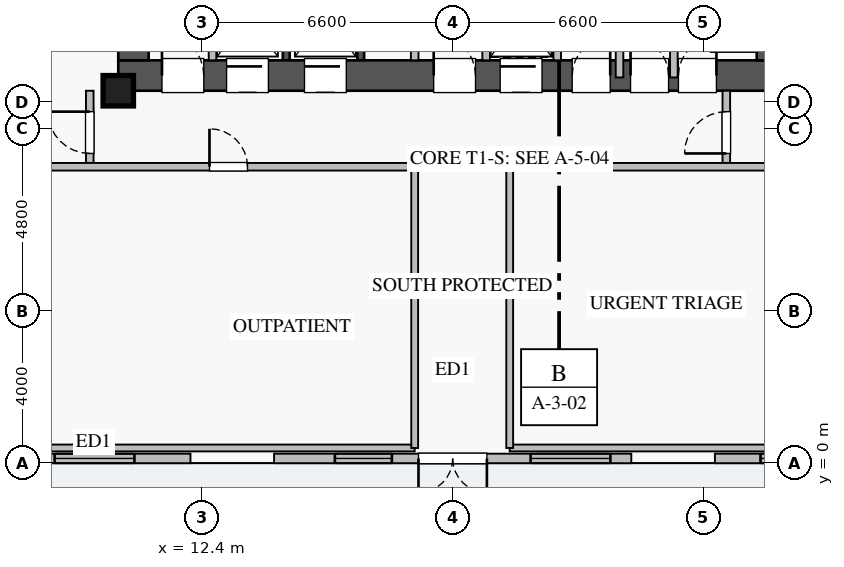
"""IFC4 building model, lengths in metres.
Left out: names, types, materials, properties, quantities, classifications, styles, units other than length and angle.
Written with IfcOpenShell. Run it as: python <this file> out.ifc"""

import sys

from ifc_helpers import new_model, si_unit, direction, frame, frame_2d, origin, origin_2d, place, context, subcontext, project, spatial, rectangle, extrude, source, transform, mapped, element, fill, save


model = new_model("IFC4")
c1 = context("Model", 3, precision=1e-05, world=origin(), true_north=direction((0.0, 1.0)))
c2 = subcontext(c1, "Body", "Model", "MODEL_VIEW")
j1 = project(units=[si_unit("LENGTHUNIT", "METRE"), si_unit("PLANEANGLEUNIT", "RADIAN")], contexts=[c1])
p1 = place(None, origin())
s1 = spatial("IfcSite", under=j1, at=p1, CompositionType="ELEMENT")
p2 = place(p1, origin())
s2 = spatial("IfcBuilding", under=s1, at=p2, CompositionType="ELEMENT")
p3 = place(p2, origin())
s3 = spatial("IfcBuildingStorey", under=s2, at=p3, CompositionType="ELEMENT", Elevation=0.0)
for number, where, z_axis, x_axis in (
    (1, (14.62, 10.6, 0.0), (0.0, 0.0, 1.0), (0.0, 1.0, 0.0)),
    (2, (16.58, 10.6, 0.0), (0.0, 0.0, 1.0), (0.0, 1.0, 0.0)),
):
    element("IfcWall", number, at=place(p3, frame(where, z_axis=z_axis, x_axis=x_axis)), inside=s3, PredefinedType="SHEAR", context=c2, shape_type="SweptSolid", body=[
        extrude(rectangle(XDim=2.2, YDim=0.18, at=frame_2d((1.1, 0.0))), origin(), (0.0, 0.0, 1.0), 4.78),
    ])
p4 = place(p3, frame((10.2, 10.2, 0.0), z_axis=(0.0, 0.0, 1.0), x_axis=(1.0, 0.0, 0.0)))
e3 = element("IfcWall", 3, at=p4, inside=s3, PredefinedType="SHEAR", context=c2, shape_type="SweptSolid", body=[
    extrude(rectangle(XDim=17.6, YDim=0.8, at=frame_2d((8.8, 0.0))), origin(), (0.0, 0.0, 1.0), 5.0),
])
p5 = place(p4, frame((1.15, 0.0, 0.0)))
e4 = element("IfcOpeningElement", 4, at=p5, cuts=e3, PredefinedType="OPENING", context=c2, shape_type="SweptSolid", body=[
    extrude(rectangle(XDim=1.1, YDim=2.05, at=frame_2d((0.55, 1.025))), frame((0.0, 0.41, 0.0), z_axis=(0.0, -1.0, 0.0), x_axis=(1.0, 0.0, 0.0)), (0.0, 0.0, 1.0), 0.82),
])
p6 = place(p4, frame((8.3, 0.0, 0.0)))
e5 = element("IfcOpeningElement", 5, at=p6, cuts=e3, PredefinedType="OPENING", context=c2, shape_type="SweptSolid", body=[
    extrude(rectangle(XDim=1.1, YDim=2.05, at=frame_2d((0.55, 1.025))), frame((0.0, 0.41, 0.0), z_axis=(0.0, -1.0, 0.0), x_axis=(1.0, 0.0, 0.0)), (0.0, 0.0, 1.0), 0.82),
])
p7 = place(p4, frame((10.05, 0.0, 0.0)))
e6 = element("IfcOpeningElement", 6, at=p7, cuts=e3, PredefinedType="OPENING", context=c2, shape_type="SweptSolid", body=[
    extrude(rectangle(XDim=1.1, YDim=2.05, at=frame_2d((0.55, 1.025))), frame((0.0, 0.41, 0.0), z_axis=(0.0, -1.0, 0.0), x_axis=(1.0, 0.0, 0.0)), (0.0, 0.0, 1.0), 0.82),
])
p8 = place(p4, frame((4.9, 0.0, 0.0)))
e7 = element("IfcOpeningElement", 7, at=p8, cuts=e3, PredefinedType="OPENING", context=c2, shape_type="SweptSolid", body=[
    extrude(rectangle(XDim=1.1, YDim=2.05, at=frame_2d((0.55, 1.025))), frame((0.0, 0.41, 0.0), z_axis=(0.0, -1.0, 0.0), x_axis=(1.0, 0.0, 0.0)), (0.0, 0.0, 1.0), 0.82),
])
p9 = place(p4, frame((2.85, 0.0, 0.0)))
e8 = element("IfcOpeningElement", 8, at=p9, cuts=e3, PredefinedType="OPENING", context=c2, shape_type="SweptSolid", body=[
    extrude(rectangle(XDim=1.1, YDim=2.05, at=frame_2d((0.55, 1.025))), frame((0.0, 0.41, 0.0), z_axis=(0.0, -1.0, 0.0), x_axis=(1.0, 0.0, 0.0)), (0.0, 0.0, 1.0), 0.82),
])
p10 = place(p4, frame((14.74, 0.0, 0.0)))
e9 = element("IfcOpeningElement", 9, at=p10, cuts=e3, PredefinedType="OPENING", context=c2, shape_type="SweptSolid", body=[
    extrude(rectangle(XDim=1.0, YDim=2.05, at=frame_2d((0.5, 1.025))), frame((0.0, 0.41, 0.0), z_axis=(0.0, -1.0, 0.0), x_axis=(1.0, 0.0, 0.0)), (0.0, 0.0, 1.0), 0.82),
])
p11 = place(p4, frame((11.945, 0.0, 0.0)))
e10 = element("IfcOpeningElement", 10, at=p11, cuts=e3, PredefinedType="OPENING", context=c2, shape_type="SweptSolid", body=[
    extrude(rectangle(XDim=1.0, YDim=2.05, at=frame_2d((0.5, 1.025))), frame((0.0, 0.41, 0.0), z_axis=(0.0, -1.0, 0.0), x_axis=(1.0, 0.0, 0.0)), (0.0, 0.0, 1.0), 0.82),
])
p12 = place(p4, frame((13.48, 0.0, 0.0)))
e11 = element("IfcOpeningElement", 11, at=p12, cuts=e3, PredefinedType="OPENING", context=c2, shape_type="SweptSolid", body=[
    extrude(rectangle(XDim=1.0, YDim=2.05, at=frame_2d((0.5, 1.025))), frame((0.0, 0.41, 0.0), z_axis=(0.0, -1.0, 0.0), x_axis=(1.0, 0.0, 0.0)), (0.0, 0.0, 1.0), 0.82),
])
p13 = place(p3, frame((10.6, 10.6, 0.0), z_axis=(0.0, 0.0, 1.0), x_axis=(0.0, 1.0, 0.0)))
e12 = element("IfcWall", 12, at=p13, inside=s3, PredefinedType="SHEAR", context=c2, shape_type="SweptSolid", body=[
    extrude(rectangle(XDim=5.6, YDim=0.8, at=frame_2d((2.8, 0.0))), origin(), (0.0, 0.0, 1.0), 5.0),
])
p14 = place(p3, frame((27.4, 10.6, 0.0), z_axis=(0.0, 0.0, 1.0), x_axis=(0.0, 1.0, 0.0)))
e13 = element("IfcWall", 13, at=p14, inside=s3, PredefinedType="SHEAR", context=c2, shape_type="SweptSolid", body=[
    extrude(rectangle(XDim=5.6, YDim=0.8, at=frame_2d((2.8, 0.0))), origin(), (0.0, 0.0, 1.0), 5.0),
])
p15 = place(p14, frame((2.1, 0.0, 0.0)))
e14 = element("IfcOpeningElement", 14, at=p15, cuts=e13, PredefinedType="OPENING", context=c2, shape_type="SweptSolid", body=[
    extrude(rectangle(XDim=1.3, YDim=2.05, at=frame_2d((0.65, 1.025))), frame((0.0, 0.41, 0.0), z_axis=(0.0, -1.0, 0.0), x_axis=(1.0, 0.0, 0.0)), (0.0, 0.0, 1.0), 0.82),
])
m1 = source(origin(), c2, "Body", "SweptSolid", [
    extrude(rectangle(XDim=0.8, YDim=0.8, at=origin_2d()), origin(), (0.0, 0.0, 1.0), 5.0),
])
p16 = place(p3, frame((10.2, 9.8, 0.0), z_axis=(0.0, 0.0, 1.0), x_axis=(1.0, 0.0, 0.0)))
e15 = element("IfcColumn", 15, at=p16, inside=s3, PredefinedType="PILASTER", context=c2, shape_type="MappedRepresentation", body=[
    mapped(m1, transform((0.0, 0.0, 0.0), x_axis=(1.0, 0.0, 0.0), y_axis=(0.0, 1.0, 0.0), z_axis=(0.0, 0.0, 1.0), scale=1.0)),
])
p17 = place(p3, frame((2.0, 0.125, 0.0), z_axis=(0.0, 0.0, 1.0), x_axis=(1.0, 0.0, 0.0)))
e16 = element("IfcWall", 16, at=p17, inside=s3, PredefinedType="STANDARD", context=c2, shape_type="SweptSolid", body=[
    extrude(rectangle(XDim=10.1, YDim=0.25, at=frame_2d((5.05, 0.0))), origin(), (0.0, 0.0, 1.0), 4.32),
])
p18 = place(p17, frame((4.15, 0.0, 0.0)))
e17 = element("IfcOpeningElement", 17, at=p18, cuts=e16, PredefinedType="OPENING", context=c2, shape_type="SweptSolid", body=[
    extrude(rectangle(XDim=1.8, YDim=2.2, at=frame_2d((0.9, 1.1))), frame((0.0, 0.135, 0.0), z_axis=(0.0, -1.0, 0.0), x_axis=(1.0, 0.0, 0.0)), (0.0, 0.0, 1.0), 0.27),
])
p19 = place(p17, frame((1.775, 0.0, 0.9)))
e18 = element("IfcOpeningElement", 18, at=p19, cuts=e16, PredefinedType="OPENING", context=c2, shape_type="SweptSolid", body=[
    extrude(rectangle(XDim=1.5, YDim=1.45, at=frame_2d((0.75, 0.725))), frame((0.0, 0.135, 0.0), z_axis=(0.0, -1.0, 0.0), x_axis=(1.0, 0.0, 0.0)), (0.0, 0.0, 1.0), 0.27),
])
p20 = place(p17, frame((6.525, 0.0, 0.9)))
e19 = element("IfcOpeningElement", 19, at=p20, cuts=e16, PredefinedType="OPENING", context=c2, shape_type="SweptSolid", body=[
    extrude(rectangle(XDim=2.1, YDim=1.48, at=frame_2d((1.05, 0.74))), frame((0.0, 0.135, 0.0), z_axis=(0.0, -1.0, 0.0), x_axis=(1.0, 0.0, 0.0)), (0.0, 0.0, 1.0), 0.27),
])
p21 = place(p3, frame((14.3, 0.125, 0.0), z_axis=(0.0, 0.0, 1.0), x_axis=(1.0, 0.0, 0.0)))
e20 = element("IfcWall", 20, at=p21, inside=s3, PredefinedType="STANDARD", context=c2, shape_type="SweptSolid", body=[
    extrude(rectangle(XDim=9.4, YDim=0.25, at=frame_2d((4.7, 0.0))), origin(), (0.0, 0.0, 1.0), 4.32),
])
p22 = place(p21, frame((3.8, 0.0, 0.0)))
e21 = element("IfcOpeningElement", 21, at=p22, cuts=e20, PredefinedType="OPENING", context=c2, shape_type="SweptSolid", body=[
    extrude(rectangle(XDim=1.8, YDim=2.2, at=frame_2d((0.9, 1.1))), frame((0.0, 0.135, 0.0), z_axis=(0.0, -1.0, 0.0), x_axis=(1.0, 0.0, 0.0)), (0.0, 0.0, 1.0), 0.27),
])
p23 = place(p21, frame((1.6, 0.0, 0.9)))
e22 = element("IfcOpeningElement", 22, at=p23, cuts=e20, PredefinedType="OPENING", context=c2, shape_type="SweptSolid", body=[
    extrude(rectangle(XDim=1.5, YDim=1.45, at=frame_2d((0.75, 0.725))), frame((0.0, 0.135, 0.0), z_axis=(0.0, -1.0, 0.0), x_axis=(1.0, 0.0, 0.0)), (0.0, 0.0, 1.0), 0.27),
])
p24 = place(p21, frame((6.75, 0.0, 0.9)))
e23 = element("IfcOpeningElement", 23, at=p24, cuts=e20, PredefinedType="OPENING", context=c2, shape_type="SweptSolid", body=[
    extrude(rectangle(XDim=2.1, YDim=1.5, at=frame_2d((1.05, 0.75))), frame((0.0, 0.135, 0.0), z_axis=(0.0, -1.0, 0.0), x_axis=(1.0, 0.0, 0.0)), (0.0, 0.0, 1.0), 0.27),
])
p25 = place(p3, frame((25.9, 0.125, 0.0), z_axis=(0.0, 0.0, 1.0), x_axis=(1.0, 0.0, 0.0)))
e24 = element("IfcWall", 24, at=p25, inside=s3, PredefinedType="STANDARD", context=c2, shape_type="SweptSolid", body=[
    extrude(rectangle(XDim=15.6, YDim=0.25, at=frame_2d((7.8, 0.0))), origin(), (0.0, 0.0, 1.0), 4.32),
])
p26 = place(p25, frame((6.9, 0.0, 0.0)))
e25 = element("IfcOpeningElement", 25, at=p26, cuts=e24, PredefinedType="OPENING", context=c2, shape_type="SweptSolid", body=[
    extrude(rectangle(XDim=1.8, YDim=2.2, at=frame_2d((0.9, 1.1))), frame((0.0, 0.135, 0.0), z_axis=(0.0, -1.0, 0.0), x_axis=(1.0, 0.0, 0.0)), (0.0, 0.0, 1.0), 0.27),
])
p27 = place(p25, frame((1.2, 0.0, 0.9)))
e26 = element("IfcOpeningElement", 26, at=p27, cuts=e24, PredefinedType="OPENING", context=c2, shape_type="SweptSolid", body=[
    extrude(rectangle(XDim=1.5, YDim=1.45, at=frame_2d((0.75, 0.725))), frame((0.0, 0.135, 0.0), z_axis=(0.0, -1.0, 0.0), x_axis=(1.0, 0.0, 0.0)), (0.0, 0.0, 1.0), 0.27),
])
p28 = place(p25, frame((12.75, 0.0, 0.9)))
e27 = element("IfcOpeningElement", 27, at=p28, cuts=e24, PredefinedType="OPENING", context=c2, shape_type="SweptSolid", body=[
    extrude(rectangle(XDim=1.8, YDim=1.45, at=frame_2d((0.9, 0.725))), frame((0.0, 0.135, 0.0), z_axis=(0.0, -1.0, 0.0), x_axis=(1.0, 0.0, 0.0)), (0.0, 0.0, 1.0), 0.27),
])
for number, where, z_axis, x_axis in (
    (28, (12.68, 10.6, 0.0), (0.0, 0.0, 1.0), (0.0, 1.0, 0.0)),
    (29, (18.0, 10.6, 0.0), (0.0, 0.0, 1.0), (0.0, 1.0, 0.0)),
    (30, (19.88, 10.6, 0.0), (0.0, 0.0, 1.0), (0.0, 1.0, 0.0)),
):
    element("IfcWall", number, at=place(p3, frame(where, z_axis=z_axis, x_axis=x_axis)), inside=s3, PredefinedType="PARTITIONING", context=c2, shape_type="SweptSolid", body=[
        extrude(rectangle(XDim=2.21, YDim=0.2, at=frame_2d((1.105, 0.0))), origin(), (0.0, 0.0, 1.0), 4.78),
    ])
p29 = place(p3, frame((24.82, 10.15, 0.0), z_axis=(0.0, 0.0, 1.0), x_axis=(0.0, 1.0, 0.0)))
e31 = element("IfcWall", 31, at=p29, inside=s3, PredefinedType="PARTITIONING", context=c2, shape_type="SweptSolid", body=[
    extrude(rectangle(XDim=2.65, YDim=0.2, at=frame_2d((1.325, 0.0))), origin(), (0.0, 0.0, 1.0), 4.78),
])
p30 = place(p3, frame((21.75, 10.6, 0.0), z_axis=(0.0, 0.0, 1.0), x_axis=(0.0, 1.0, 0.0)))
e32 = element("IfcWall", 32, at=p30, inside=s3, PredefinedType="PARTITIONING", context=c2, shape_type="SweptSolid", body=[
    extrude(rectangle(XDim=2.2, YDim=0.2, at=frame_2d((1.1, 0.0))), origin(), (0.0, 0.0, 1.0), 4.78),
])
p31 = place(p3, frame((23.39, 10.15, 0.0), z_axis=(0.0, 0.0, 1.0), x_axis=(0.0, 1.0, 0.0)))
e33 = element("IfcWall", 33, at=p31, inside=s3, PredefinedType="PARTITIONING", context=c2, shape_type="SweptSolid", body=[
    extrude(rectangle(XDim=2.65, YDim=0.2, at=frame_2d((1.325, 0.0))), origin(), (0.0, 0.0, 1.0), 4.78),
])
p32 = place(p3, frame((9.45, 7.8, 0.0), z_axis=(0.0, 0.0, 1.0), x_axis=(0.0, 1.0, 0.0)))
e34 = element("IfcWall", 34, at=p32, inside=s3, PredefinedType="PARTITIONING", context=c2, shape_type="SweptSolid", body=[
    extrude(rectangle(XDim=2.0, YDim=0.2, at=frame_2d((1.0, 0.0))), origin(), (0.0, 0.0, 1.0), 4.78),
])
p33 = place(p32, frame((0.35, 0.0, 0.0)))
e35 = element("IfcOpeningElement", 35, at=p33, cuts=e34, PredefinedType="OPENING", context=c2, shape_type="SweptSolid", body=[
    extrude(rectangle(XDim=1.1, YDim=2.05, at=frame_2d((0.55, 1.025))), frame((0.0, 0.11, 0.0), z_axis=(0.0, -1.0, 0.0), x_axis=(1.0, 0.0, 0.0)), (0.0, 0.0, 1.0), 0.22),
])
p34 = place(p3, frame((26.2, 7.8, 0.0), z_axis=(0.0, 0.0, 1.0), x_axis=(0.0, 1.0, 0.0)))
e36 = element("IfcWall", 36, at=p34, inside=s3, PredefinedType="PARTITIONING", context=c2, shape_type="SweptSolid", body=[
    extrude(rectangle(XDim=2.0, YDim=0.2, at=frame_2d((1.0, 0.0))), origin(), (0.0, 0.0, 1.0), 4.78),
])
p35 = place(p34, frame((0.35, 0.0, 0.0)))
e37 = element("IfcOpeningElement", 37, at=p35, cuts=e36, PredefinedType="OPENING", context=c2, shape_type="SweptSolid", body=[
    extrude(rectangle(XDim=1.1, YDim=2.05, at=frame_2d((0.55, 1.025))), frame((0.0, 0.11, 0.0), z_axis=(0.0, -1.0, 0.0), x_axis=(1.0, 0.0, 0.0)), (0.0, 0.0, 1.0), 0.22),
])
p36 = place(p3, frame((8.2, 7.8, 0.0), z_axis=(0.0, 0.0, 1.0), x_axis=(1.0, 0.0, 0.0)))
e38 = element("IfcWall", 38, at=p36, inside=s3, PredefinedType="PARTITIONING", context=c2, shape_type="SweptSolid", body=[
    extrude(rectangle(XDim=9.8, YDim=0.2, at=frame_2d((4.9, 0.0))), origin(), (0.0, 0.0, 1.0), 4.78),
])
p37 = place(p36, frame((4.4, 0.0, 0.0)))
e39 = element("IfcOpeningElement", 39, at=p37, cuts=e38, PredefinedType="OPENING", context=c2, shape_type="SweptSolid", body=[
    extrude(rectangle(XDim=1.0, YDim=2.05, at=frame_2d((0.5, 1.025))), frame((0.0, 0.11, 0.0), z_axis=(0.0, -1.0, 0.0), x_axis=(1.0, 0.0, 0.0)), (0.0, 0.0, 1.0), 0.22),
])
p38 = place(p3, frame((20.5, 7.8, 0.0), z_axis=(0.0, 0.0, 1.0), x_axis=(1.0, 0.0, 0.0)))
e40 = element("IfcWall", 40, at=p38, inside=s3, PredefinedType="PARTITIONING", context=c2, shape_type="SweptSolid", body=[
    extrude(rectangle(XDim=12.0, YDim=0.2, at=frame_2d((6.0, 0.0))), origin(), (0.0, 0.0, 1.0), 4.78),
])
p39 = place(p38, frame((8.65, 0.0, 0.0)))
e41 = element("IfcOpeningElement", 41, at=p39, cuts=e40, PredefinedType="OPENING", context=c2, shape_type="SweptSolid", body=[
    extrude(rectangle(XDim=1.0, YDim=2.05, at=frame_2d((0.5, 1.025))), frame((0.0, 0.11, 0.0), z_axis=(0.0, -1.0, 0.0), x_axis=(1.0, 0.0, 0.0)), (0.0, 0.0, 1.0), 0.22),
])
p40 = place(p3, frame((8.2, 0.4, 0.0), z_axis=(0.0, 0.0, 1.0), x_axis=(1.0, 0.0, 0.0)))
e42 = element("IfcWall", 42, at=p40, inside=s3, PredefinedType="PARTITIONING", context=c2, shape_type="SweptSolid", body=[
    extrude(rectangle(XDim=9.8, YDim=0.18, at=frame_2d((4.9, 0.0))), origin(), (0.0, 0.0, 1.0), 4.78),
])
p41 = place(p3, frame((18.0, 0.4, 0.0), z_axis=(0.0, 0.0, 1.0), x_axis=(0.0, 1.0, 0.0)))
e43 = element("IfcWall", 43, at=p41, inside=s3, PredefinedType="PARTITIONING", context=c2, shape_type="SweptSolid", body=[
    extrude(rectangle(XDim=7.4, YDim=0.18, at=frame_2d((3.7, 0.0))), origin(), (0.0, 0.0, 1.0), 4.78),
])
p42 = place(p3, frame((20.5, 0.4, 0.0), z_axis=(0.0, 0.0, 1.0), x_axis=(1.0, 0.0, 0.0)))
e44 = element("IfcWall", 44, at=p42, inside=s3, PredefinedType="PARTITIONING", context=c2, shape_type="SweptSolid", body=[
    extrude(rectangle(XDim=12.0, YDim=0.18, at=frame_2d((6.0, 0.0))), origin(), (0.0, 0.0, 1.0), 4.78),
])
p43 = place(p3, frame((20.5, 0.4, 0.0), z_axis=(0.0, 0.0, 1.0), x_axis=(0.0, 1.0, 0.0)))
e45 = element("IfcWall", 45, at=p43, inside=s3, PredefinedType="PARTITIONING", context=c2, shape_type="SweptSolid", body=[
    extrude(rectangle(XDim=7.4, YDim=0.18, at=frame_2d((3.7, 0.0))), origin(), (0.0, 0.0, 1.0), 4.78),
])
m2 = source(origin(), c2, "Body", "SweptSolid", [
    extrude(rectangle(XDim=2.1, YDim=1.48, at=frame_2d((1.05, 0.74))), frame((0.0, 0.03, 0.0), z_axis=(0.0, -1.0, 0.0), x_axis=(1.0, 0.0, 0.0)), (0.0, 0.0, 1.0), 0.06),
])
p44 = place(p20, origin())
e46 = element("IfcWindow", 46, at=p44, inside=s3, PartitioningType="TRIPLE_PANEL_VERTICAL", PredefinedType="WINDOW", context=c2, shape_type="MappedRepresentation", body=[
    mapped(m2, transform((0.0, 0.0, 0.0), x_axis=(1.0, 0.0, 0.0), y_axis=(0.0, 1.0, 0.0), z_axis=(0.0, 0.0, 1.0), scale=1.0)),
])
fill(e19, e46)
m3 = source(origin(), c2, "Body", "SweptSolid", [
    extrude(rectangle(XDim=1.8, YDim=2.2, at=frame_2d((0.9, 1.1))), frame((0.0, 0.025, 0.0), z_axis=(0.0, -1.0, 0.0), x_axis=(1.0, 0.0, 0.0)), (0.0, 0.0, 1.0), 0.05),
])
p45 = place(p22, frame((1.8, 0.0, 0.0), z_axis=(0.0, 0.0, 1.0), x_axis=(-1.0, 0.0, 0.0)))
e47 = element("IfcDoor", 47, at=p45, inside=s3, OperationType="DOUBLE_DOOR_SINGLE_SWING", PredefinedType="DOOR", context=c2, shape_type="MappedRepresentation", body=[
    mapped(m3, transform((0.0, 0.0, 0.0), x_axis=(1.0, 0.0, 0.0), y_axis=(0.0, 1.0, 0.0), z_axis=(0.0, 0.0, 1.0), scale=1.0)),
])
fill(e21, e47)
m4 = source(origin(), c2, "Body", "SweptSolid", [
    extrude(rectangle(XDim=1.5, YDim=1.45, at=frame_2d((0.75, 0.725))), frame((0.0, 0.03, 0.0), z_axis=(0.0, -1.0, 0.0), x_axis=(1.0, 0.0, 0.0)), (0.0, 0.0, 1.0), 0.06),
])
p46 = place(p23, origin())
e48 = element("IfcWindow", 48, at=p46, inside=s3, PartitioningType="DOUBLE_PANEL_VERTICAL", PredefinedType="WINDOW", context=c2, shape_type="MappedRepresentation", body=[
    mapped(m4, transform((0.0, 0.0, 0.0), x_axis=(1.0, 0.0, 0.0), y_axis=(0.0, 1.0, 0.0), z_axis=(0.0, 0.0, 1.0), scale=1.0)),
])
fill(e22, e48)
m5 = source(origin(), c2, "Body", "SweptSolid", [
    extrude(rectangle(XDim=2.1, YDim=1.5, at=frame_2d((1.05, 0.75))), frame((0.0, 0.03, 0.0), z_axis=(0.0, -1.0, 0.0), x_axis=(1.0, 0.0, 0.0)), (0.0, 0.0, 1.0), 0.06),
])
p47 = place(p24, origin())
e49 = element("IfcWindow", 49, at=p47, inside=s3, PartitioningType="TRIPLE_PANEL_VERTICAL", PredefinedType="WINDOW", context=c2, shape_type="MappedRepresentation", body=[
    mapped(m5, transform((0.0, 0.0, 0.0), x_axis=(1.0, 0.0, 0.0), y_axis=(0.0, 1.0, 0.0), z_axis=(0.0, 0.0, 1.0), scale=1.0)),
])
fill(e23, e49)
p48 = place(p27, origin())
e50 = element("IfcWindow", 50, at=p48, inside=s3, PartitioningType="DOUBLE_PANEL_VERTICAL", PredefinedType="WINDOW", context=c2, shape_type="MappedRepresentation", body=[
    mapped(m4, transform((0.0, 0.0, 0.0), x_axis=(1.0, 0.0, 0.0), y_axis=(0.0, 1.0, 0.0), z_axis=(0.0, 0.0, 1.0), scale=1.0)),
])
fill(e26, e50)
m6 = source(origin(), c2, "Body", "SweptSolid", [
    extrude(rectangle(XDim=1.1, YDim=2.05, at=frame_2d((0.55, 1.025))), frame((0.0, 0.025, 0.0), z_axis=(0.0, -1.0, 0.0), x_axis=(1.0, 0.0, 0.0)), (0.0, 0.0, 1.0), 0.05),
])
p49 = place(p5, origin())
e51 = element("IfcDoor", 51, at=p49, inside=s3, OperationType="SINGLE_SWING_LEFT", PredefinedType="DOOR", context=c2, shape_type="MappedRepresentation", body=[
    mapped(m6, transform((0.0, 0.0, 0.0), x_axis=(1.0, 0.0, 0.0), y_axis=(0.0, 1.0, 0.0), z_axis=(0.0, 0.0, 1.0), scale=1.0)),
])
fill(e4, e51)
p50 = place(p6, origin())
e52 = element("IfcDoor", 52, at=p50, inside=s3, OperationType="SINGLE_SWING_LEFT", PredefinedType="DOOR", context=c2, shape_type="MappedRepresentation", body=[
    mapped(m6, transform((0.0, 0.0, 0.0), x_axis=(1.0, 0.0, 0.0), y_axis=(0.0, 1.0, 0.0), z_axis=(0.0, 0.0, 1.0), scale=1.0)),
])
fill(e5, e52)
p51 = place(p7, origin())
e53 = element("IfcDoor", 53, at=p51, inside=s3, OperationType="SLIDING_TO_RIGHT", PredefinedType="DOOR", context=c2, shape_type="MappedRepresentation", body=[
    mapped(m6, transform((0.0, 0.0, 0.0), x_axis=(1.0, 0.0, 0.0), y_axis=(0.0, 1.0, 0.0), z_axis=(0.0, 0.0, 1.0), scale=1.0)),
])
fill(e6, e53)
p52 = place(p8, origin())
e54 = element("IfcDoor", 54, at=p52, inside=s3, OperationType="SLIDING_TO_RIGHT", PredefinedType="DOOR", context=c2, shape_type="MappedRepresentation", body=[
    mapped(m6, transform((0.0, 0.0, 0.0), x_axis=(1.0, 0.0, 0.0), y_axis=(0.0, 1.0, 0.0), z_axis=(0.0, 0.0, 1.0), scale=1.0)),
])
fill(e7, e54)
p53 = place(p9, origin())
e55 = element("IfcDoor", 55, at=p53, inside=s3, OperationType="SLIDING_TO_RIGHT", PredefinedType="DOOR", context=c2, shape_type="MappedRepresentation", body=[
    mapped(m6, transform((0.0, 0.0, 0.0), x_axis=(1.0, 0.0, 0.0), y_axis=(0.0, 1.0, 0.0), z_axis=(0.0, 0.0, 1.0), scale=1.0)),
])
fill(e8, e55)
m7 = source(origin(), c2, "Body", "SweptSolid", [
    extrude(rectangle(XDim=1.0, YDim=2.05, at=frame_2d((0.5, 1.025))), frame((0.0, 0.025, 0.0), z_axis=(0.0, -1.0, 0.0), x_axis=(1.0, 0.0, 0.0)), (0.0, 0.0, 1.0), 0.05),
])
p54 = place(p10, origin())
e56 = element("IfcDoor", 56, at=p54, inside=s3, OperationType="SINGLE_SWING_RIGHT", PredefinedType="DOOR", context=c2, shape_type="MappedRepresentation", body=[
    mapped(m7, transform((0.0, 0.0, 0.0), x_axis=(1.0, 0.0, 0.0), y_axis=(0.0, 1.0, 0.0), z_axis=(0.0, 0.0, 1.0), scale=1.0)),
])
fill(e9, e56)
p55 = place(p11, origin())
e57 = element("IfcDoor", 57, at=p55, inside=s3, OperationType="SINGLE_SWING_RIGHT", PredefinedType="DOOR", context=c2, shape_type="MappedRepresentation", body=[
    mapped(m7, transform((0.0, 0.0, 0.0), x_axis=(1.0, 0.0, 0.0), y_axis=(0.0, 1.0, 0.0), z_axis=(0.0, 0.0, 1.0), scale=1.0)),
])
fill(e10, e57)
p56 = place(p12, origin())
e58 = element("IfcDoor", 58, at=p56, inside=s3, OperationType="SINGLE_SWING_LEFT", PredefinedType="DOOR", context=c2, shape_type="MappedRepresentation", body=[
    mapped(m7, transform((0.0, 0.0, 0.0), x_axis=(1.0, 0.0, 0.0), y_axis=(0.0, 1.0, 0.0), z_axis=(0.0, 0.0, 1.0), scale=1.0)),
])
fill(e11, e58)
p57 = place(p33, origin())
e59 = element("IfcDoor", 59, at=p57, inside=s3, OperationType="SINGLE_SWING_RIGHT", PredefinedType="DOOR", context=c2, shape_type="MappedRepresentation", body=[
    mapped(m6, transform((0.0, 0.0, 0.0), x_axis=(1.0, 0.0, 0.0), y_axis=(0.0, 1.0, 0.0), z_axis=(0.0, 0.0, 1.0), scale=1.0)),
])
fill(e35, e59)
p58 = place(p35, origin())
e60 = element("IfcDoor", 60, at=p58, inside=s3, OperationType="SINGLE_SWING_LEFT", PredefinedType="DOOR", context=c2, shape_type="MappedRepresentation", body=[
    mapped(m6, transform((0.0, 0.0, 0.0), x_axis=(1.0, 0.0, 0.0), y_axis=(0.0, 1.0, 0.0), z_axis=(0.0, 0.0, 1.0), scale=1.0)),
])
fill(e37, e60)
p59 = place(p37, origin())
e61 = element("IfcDoor", 61, at=p59, inside=s3, OperationType="SINGLE_SWING_LEFT", PredefinedType="DOOR", context=c2, shape_type="MappedRepresentation", body=[
    mapped(m7, transform((0.0, 0.0, 0.0), x_axis=(1.0, 0.0, 0.0), y_axis=(0.0, 1.0, 0.0), z_axis=(0.0, 0.0, 1.0), scale=1.0)),
])
fill(e39, e61)
save(model, sys.argv[1])
